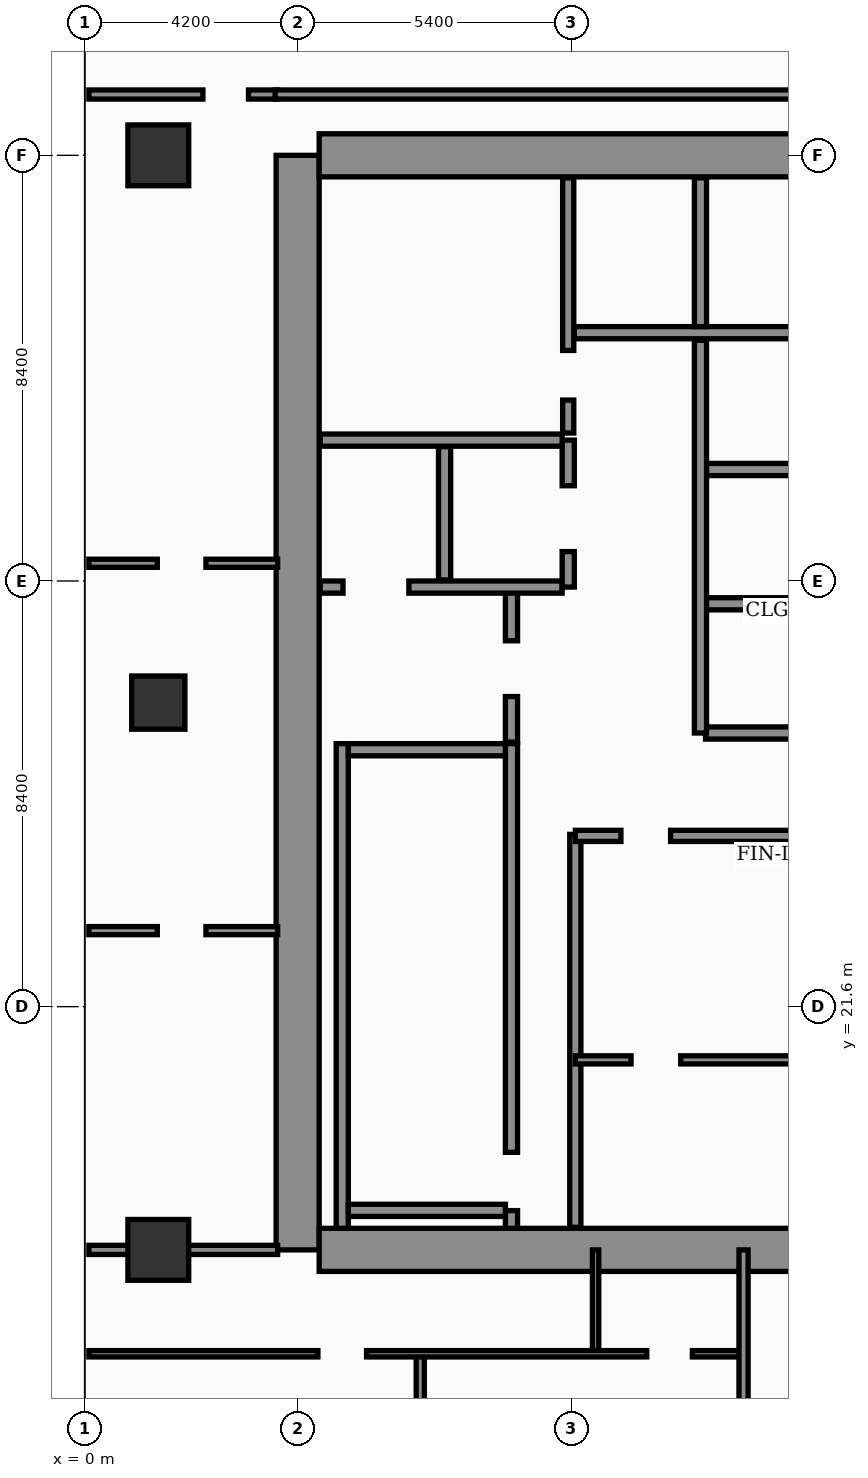
"""IFC4 building model, lengths in metres.
Left out: names, types, materials, properties, quantities, classifications, styles, units other than length and angle.
Written with IfcOpenShell. Run it as: python <this file> out.ifc"""

import sys

from ifc_helpers import new_model, si_unit, direction, frame, frame_2d, origin, origin_2d, place, context, subcontext, project, spatial, rectangle, extrude, element, fill, save


model = new_model("IFC4")
c1 = context("Model", 3, precision=1e-05, world=origin(), true_north=direction((0.0, 1.0)))
c2 = subcontext(c1, "Body", "Model", "MODEL_VIEW")
j1 = project(units=[si_unit("LENGTHUNIT", "METRE"), si_unit("PLANEANGLEUNIT", "RADIAN")], contexts=[c1])
p1 = place(None, origin())
s1 = spatial("IfcSite", under=j1, at=p1, CompositionType="ELEMENT")
p2 = place(p1, origin())
s2 = spatial("IfcBuilding", under=s1, at=p2, CompositionType="ELEMENT")
p3 = place(p2, frame((0.0, 0.0, 171.3)))
s3 = spatial("IfcBuildingStorey", under=s2, at=p3, CompositionType="ELEMENT", Elevation=171.3)
p4 = place(p3, frame((4.2, 16.8, 0.0), z_axis=(0.0, 0.0, 1.0), x_axis=(0.0, 1.0, 0.0)))
e1 = element("IfcWall", 1, at=p4, inside=s3, PredefinedType="SHEAR", context=c2, shape_type="SweptSolid", body=[
    extrude(rectangle(XDim=21.6, YDim=0.85, at=frame_2d((10.8, 0.0))), origin(), (0.0, 0.0, 1.0), 3.56),
])
for number, where, z_axis, x_axis in (
    (2, (4.625, 38.4, 0.0), (0.0, 0.0, 1.0), (1.0, 0.0, 0.0)),
    (3, (4.625, 16.8, 0.0), (0.0, 0.0, 1.0), (1.0, 0.0, 0.0)),
):
    element("IfcWall", number, at=place(p3, frame(where, z_axis=z_axis, x_axis=x_axis)), inside=s3, PredefinedType="SHEAR", context=c2, shape_type="SweptSolid", body=[
        extrude(rectangle(XDim=9.95, YDim=0.85, at=frame_2d((4.975, 0.0))), origin(), (0.0, 0.0, 1.0), 3.56),
    ])
p5 = place(p3, frame((5.08, 17.225, 0.0), z_axis=(0.0, 0.0, 1.0), x_axis=(0.0, 1.0, 0.0)))
e4 = element("IfcWall", 4, at=p5, inside=s3, PredefinedType="SOLIDWALL", context=c2, shape_type="SweptSolid", body=[
    extrude(rectangle(XDim=9.565, YDim=0.24, at=frame_2d((4.782, 0.0))), origin(), (0.0, 0.0, 1.0), 3.56),
])
p6 = place(p3, frame((8.42, 17.225, 0.0), z_axis=(0.0, 0.0, 1.0), x_axis=(0.0, 1.0, 0.0)))
e5 = element("IfcWall", 5, at=p6, inside=s3, PredefinedType="SOLIDWALL", context=c2, shape_type="SweptSolid", body=[
    extrude(rectangle(XDim=9.565, YDim=0.24, at=frame_2d((4.782, 0.0))), origin(), (0.0, 0.0, 1.0), 3.56),
])
p7 = place(p6, frame((0.35, 0.0, 0.0)))
e6 = element("IfcOpeningElement", 6, at=p7, cuts=e5, PredefinedType="OPENING", context=c2, shape_type="SweptSolid", body=[
    extrude(rectangle(XDim=1.15, YDim=2.2, at=frame_2d((0.575, 1.1))), frame((0.0, 0.13, 0.0), z_axis=(0.0, -1.0, 0.0), x_axis=(1.0, 0.0, 0.0)), (0.0, 0.0, 1.0), 0.26),
])
for number, where, z_axis, x_axis in (
    (7, (5.2, 17.58, 0.0), (0.0, 0.0, 1.0), (1.0, 0.0, 0.0)),
    (8, (5.2, 26.67, 0.0), (0.0, 0.0, 1.0), (1.0, 0.0, 0.0)),
):
    element("IfcWall", number, at=place(p3, frame(where, z_axis=z_axis, x_axis=x_axis)), inside=s3, PredefinedType="SOLIDWALL", context=c2, shape_type="SweptSolid", body=[
        extrude(rectangle(XDim=3.1, YDim=0.24, at=frame_2d((1.55, 0.0))), origin(), (0.0, 0.0, 1.0), 3.56),
    ])
for number, where, z_axis, x_axis in (
    (9, (12.18, 29.55, 0.0), (0.0, 0.0, 1.0), (1.0, 0.0, 0.0)),
    (10, (12.18, 32.2, 0.0), (0.0, 0.0, 1.0), (1.0, 0.0, 0.0)),
):
    element("IfcWall", number, at=place(p3, frame(where, z_axis=z_axis, x_axis=x_axis)), inside=s3, PredefinedType="SOLIDWALL", context=c2, shape_type="SweptSolid", body=[
        extrude(rectangle(XDim=2.395, YDim=0.24, at=frame_2d((1.198, 0.0))), origin(), (0.0, 0.0, 1.0), 3.56),
    ])
p8 = place(p3, frame((1.45, 16.8, 0.0), z_axis=(0.0, 0.0, 1.0), x_axis=(1.0, 0.0, 0.0)))
e11 = element("IfcColumn", 11, at=p8, inside=s3, PredefinedType="COLUMN", context=c2, shape_type="SweptSolid", body=[
    extrude(rectangle(XDim=1.2, YDim=1.2, at=origin_2d()), origin(), (0.0, 0.0, 1.0), 3.56),
])
p9 = place(p3, frame((1.45, 27.6, 0.0), z_axis=(0.0, 0.0, 1.0), x_axis=(1.0, 0.0, 0.0)))
e12 = element("IfcColumn", 12, at=p9, inside=s3, PredefinedType="COLUMN", context=c2, shape_type="SweptSolid", body=[
    extrude(rectangle(XDim=1.05, YDim=1.05, at=origin_2d()), origin(), (0.0, 0.0, 1.0), 3.56),
])
p10 = place(p3, frame((1.45, 38.4, 0.0), z_axis=(0.0, 0.0, 1.0), x_axis=(1.0, 0.0, 0.0)))
e13 = element("IfcColumn", 13, at=p10, inside=s3, PredefinedType="COLUMN", context=c2, shape_type="SweptSolid", body=[
    extrude(rectangle(XDim=1.2, YDim=1.2, at=origin_2d()), origin(), (0.0, 0.0, 1.0), 3.56),
])
p11 = place(p3, frame((8.42, 26.82, 0.0), z_axis=(0.0, 0.0, 1.0), x_axis=(0.0, 1.0, 0.0)))
e14 = element("IfcWall", 14, at=p11, inside=s3, PredefinedType="SOLIDWALL", context=c2, shape_type="SweptSolid", body=[
    extrude(rectangle(XDim=3.0, YDim=0.24, at=frame_2d((1.5, 0.0))), origin(), (0.0, 0.0, 1.0), 3.56),
])
p12 = place(p11, frame((0.9, 0.0, 0.0)))
e15 = element("IfcOpeningElement", 15, at=p12, cuts=e14, PredefinedType="OPENING", context=c2, shape_type="SweptSolid", body=[
    extrude(rectangle(XDim=1.1, YDim=2.2, at=frame_2d((0.55, 1.1))), frame((0.0, 0.13, 0.0), z_axis=(0.0, -1.0, 0.0), x_axis=(1.0, 0.0, 0.0)), (0.0, 0.0, 1.0), 0.26),
])
p13 = place(p3, frame((4.645, 29.88, 0.0), z_axis=(0.0, 0.0, 1.0), x_axis=(1.0, 0.0, 0.0)))
e16 = element("IfcWall", 16, at=p13, inside=s3, PredefinedType="SOLIDWALL", context=c2, shape_type="SweptSolid", body=[
    extrude(rectangle(XDim=4.775, YDim=0.24, at=frame_2d((2.387, 0.0))), origin(), (0.0, 0.0, 1.0), 3.56),
])
p14 = place(p13, frame((0.45, 0.0, 0.0)))
e17 = element("IfcOpeningElement", 17, at=p14, cuts=e16, PredefinedType="OPENING", context=c2, shape_type="SweptSolid", body=[
    extrude(rectangle(XDim=1.3, YDim=2.35, at=frame_2d((0.65, 1.175))), frame((0.0, 0.13, 0.0), z_axis=(0.0, -1.0, 0.0), x_axis=(1.0, 0.0, 0.0)), (0.0, 0.0, 1.0), 0.26),
])
p15 = place(p3, frame((7.1, 30.02, 0.0), z_axis=(0.0, 0.0, 1.0), x_axis=(0.0, 1.0, 0.0)))
e18 = element("IfcWall", 18, at=p15, inside=s3, PredefinedType="SOLIDWALL", context=c2, shape_type="SweptSolid", body=[
    extrude(rectangle(XDim=2.63, YDim=0.24, at=frame_2d((1.315, 0.0))), origin(), (0.0, 0.0, 1.0), 3.56),
])
p16 = place(p3, frame((9.54, 29.88, 0.0), z_axis=(0.0, 0.0, 1.0), x_axis=(0.0, 1.0, 0.0)))
e19 = element("IfcWall", 19, at=p16, inside=s3, PredefinedType="SOLIDWALL", context=c2, shape_type="SweptSolid", body=[
    extrude(rectangle(XDim=2.9, YDim=0.24, at=frame_2d((1.45, 0.0))), origin(), (0.0, 0.0, 1.0), 3.56),
])
p17 = place(p16, frame((0.7, 0.0, 0.0)))
e20 = element("IfcOpeningElement", 20, at=p17, cuts=e19, PredefinedType="OPENING", context=c2, shape_type="SweptSolid", body=[
    extrude(rectangle(XDim=1.3, YDim=2.35, at=frame_2d((0.65, 1.175))), frame((0.0, 0.13, 0.0), z_axis=(0.0, -1.0, 0.0), x_axis=(1.0, 0.0, 0.0)), (0.0, 0.0, 1.0), 0.26),
])
p18 = place(p3, frame((4.645, 32.78, 0.0), z_axis=(0.0, 0.0, 1.0), x_axis=(1.0, 0.0, 0.0)))
e21 = element("IfcWall", 21, at=p18, inside=s3, PredefinedType="SOLIDWALL", context=c2, shape_type="SweptSolid", body=[
    extrude(rectangle(XDim=4.775, YDim=0.24, at=frame_2d((2.387, 0.0))), origin(), (0.0, 0.0, 1.0), 3.19),
])
p19 = place(p3, frame((9.68, 17.245, 0.0), z_axis=(0.0, 0.0, 1.0), x_axis=(0.0, 1.0, 0.0)))
e22 = element("IfcWall", 22, at=p19, inside=s3, PredefinedType="SOLIDWALL", context=c2, shape_type="SweptSolid", body=[
    extrude(rectangle(XDim=7.755, YDim=0.22, at=frame_2d((3.877, 0.0))), origin(), (0.0, 0.0, 1.0), 3.56),
])
p20 = place(p3, frame((9.54, 32.92, 0.0), z_axis=(0.0, 0.0, 1.0), x_axis=(0.0, 1.0, 0.0)))
e23 = element("IfcWall", 23, at=p20, inside=s3, PredefinedType="SOLIDWALL", context=c2, shape_type="SweptSolid", body=[
    extrude(rectangle(XDim=5.035, YDim=0.22, at=frame_2d((2.518, 0.0))), origin(), (0.0, 0.0, 1.0), 3.56),
])
p21 = place(p20, frame((0.65, 0.0, 0.0)))
e24 = element("IfcOpeningElement", 24, at=p21, cuts=e23, PredefinedType="OPENING", context=c2, shape_type="SweptSolid", body=[
    extrude(rectangle(XDim=0.98, YDim=2.15, at=frame_2d((0.49, 1.075))), frame((0.0, 0.12, 0.0), z_axis=(0.0, -1.0, 0.0), x_axis=(1.0, 0.0, 0.0)), (0.0, 0.0, 1.0), 0.24),
])
p22 = place(p3, frame((9.68, 20.55, 0.0), z_axis=(0.0, 0.0, 1.0), x_axis=(1.0, 0.0, 0.0)))
e25 = element("IfcWall", 25, at=p22, inside=s3, PredefinedType="PARTITIONING", context=c2, shape_type="SweptSolid", body=[
    extrude(rectangle(XDim=4.875, YDim=0.16, at=frame_2d((2.438, 0.0))), origin(), (0.0, 0.0, 1.0), 3.56),
])
p23 = place(p22, frame((1.1, 0.0, 0.0)))
e26 = element("IfcOpeningElement", 26, at=p23, cuts=e25, PredefinedType="OPENING", context=c2, shape_type="SweptSolid", body=[
    extrude(rectangle(XDim=0.98, YDim=2.15, at=frame_2d((0.49, 1.075))), frame((0.0, 0.09, 0.0), z_axis=(0.0, -1.0, 0.0), x_axis=(1.0, 0.0, 0.0)), (0.0, 0.0, 1.0), 0.18),
])
p24 = place(p3, frame((9.68, 24.97, 0.0), z_axis=(0.0, 0.0, 1.0), x_axis=(1.0, 0.0, 0.0)))
e27 = element("IfcWall", 27, at=p24, inside=s3, PredefinedType="SOLIDWALL", context=c2, shape_type="SweptSolid", body=[
    extrude(rectangle(XDim=4.875, YDim=0.22, at=frame_2d((2.438, 0.0))), origin(), (0.0, 0.0, 1.0), 2.94),
])
p25 = place(p24, frame((0.9, 0.0, 0.0)))
e28 = element("IfcOpeningElement", 28, at=p25, cuts=e27, PredefinedType="OPENING", context=c2, shape_type="SweptSolid", body=[
    extrude(rectangle(XDim=0.98, YDim=2.15, at=frame_2d((0.49, 1.075))), frame((0.0, 0.12, 0.0), z_axis=(0.0, -1.0, 0.0), x_axis=(1.0, 0.0, 0.0)), (0.0, 0.0, 1.0), 0.24),
])
p26 = place(p3, frame((12.25, 27.0, 0.0), z_axis=(0.0, 0.0, 1.0), x_axis=(1.0, 0.0, 0.0)))
e29 = element("IfcWall", 29, at=p26, inside=s3, PredefinedType="SOLIDWALL", context=c2, shape_type="SweptSolid", body=[
    extrude(rectangle(XDim=2.305, YDim=0.24, at=frame_2d((1.152, 0.0))), origin(), (0.0, 0.0, 1.0), 3.56),
])
p27 = place(p3, frame((12.15, 27.0, 0.0), z_axis=(0.0, 0.0, 1.0), x_axis=(0.0, 1.0, 0.0)))
e30 = element("IfcWall", 30, at=p27, inside=s3, PredefinedType="SOLIDWALL", context=c2, shape_type="SweptSolid", body=[
    extrude(rectangle(XDim=7.75, YDim=0.24, at=frame_2d((3.875, 0.0))), origin(), (0.0, 0.0, 1.0), 3.56),
])
p28 = place(p3, frame((9.66, 34.9, 0.0), z_axis=(0.0, 0.0, 1.0), x_axis=(1.0, 0.0, 0.0)))
e31 = element("IfcWall", 31, at=p28, inside=s3, PredefinedType="SOLIDWALL", context=c2, shape_type="SweptSolid", body=[
    extrude(rectangle(XDim=4.895, YDim=0.24, at=frame_2d((2.448, 0.0))), origin(), (0.0, 0.0, 1.0), 3.56),
])
p29 = place(p3, frame((12.15, 35.02, 0.0), z_axis=(0.0, 0.0, 1.0), x_axis=(0.0, 1.0, 0.0)))
e32 = element("IfcWall", 32, at=p29, inside=s3, PredefinedType="SOLIDWALL", context=c2, shape_type="SweptSolid", body=[
    extrude(rectangle(XDim=2.935, YDim=0.24, at=frame_2d((1.468, 0.0))), origin(), (0.0, 0.0, 1.0), 3.56),
])
p30 = place(p3, frame((0.08, 23.1, 0.0), z_axis=(0.0, 0.0, 1.0), x_axis=(1.0, 0.0, 0.0)))
e33 = element("IfcWall", 33, at=p30, inside=s3, PredefinedType="PARTITIONING", context=c2, shape_type="SweptSolid", body=[
    extrude(rectangle(XDim=3.725, YDim=0.16, at=frame_2d((1.862, 0.0))), origin(), (0.0, 0.0, 1.0), 3.04),
])
p31 = place(p30, frame((1.35, 0.0, 0.0)))
e34 = element("IfcOpeningElement", 34, at=p31, cuts=e33, PredefinedType="OPENING", context=c2, shape_type="SweptSolid", body=[
    extrude(rectangle(XDim=0.96, YDim=2.2, at=frame_2d((0.48, 1.1))), frame((0.0, 0.09, 0.0), z_axis=(0.0, -1.0, 0.0), x_axis=(1.0, 0.0, 0.0)), (0.0, 0.0, 1.0), 0.18),
])
p32 = place(p3, frame((0.08, 30.35, 0.0), z_axis=(0.0, 0.0, 1.0), x_axis=(1.0, 0.0, 0.0)))
e35 = element("IfcWall", 35, at=p32, inside=s3, PredefinedType="PARTITIONING", context=c2, shape_type="SweptSolid", body=[
    extrude(rectangle(XDim=3.725, YDim=0.16, at=frame_2d((1.862, 0.0))), origin(), (0.0, 0.0, 1.0), 3.04),
])
p33 = place(p32, frame((1.35, 0.0, 0.0)))
e36 = element("IfcOpeningElement", 36, at=p33, cuts=e35, PredefinedType="OPENING", context=c2, shape_type="SweptSolid", body=[
    extrude(rectangle(XDim=0.96, YDim=2.2, at=frame_2d((0.48, 1.1))), frame((0.0, 0.09, 0.0), z_axis=(0.0, -1.0, 0.0), x_axis=(1.0, 0.0, 0.0)), (0.0, 0.0, 1.0), 0.18),
])
p34 = place(p3, frame((0.08, 16.8, 0.0), z_axis=(0.0, 0.0, 1.0), x_axis=(1.0, 0.0, 0.0)))
e37 = element("IfcWall", 37, at=p34, inside=s3, PredefinedType="PARTITIONING", context=c2, shape_type="SweptSolid", body=[
    extrude(rectangle(XDim=3.725, YDim=0.18, at=frame_2d((1.862, 0.0))), origin(), (0.0, 0.0, 1.0), 2.94),
])
p35 = place(p3, frame((0.08, 39.6, 0.0), z_axis=(0.0, 0.0, 1.0), x_axis=(1.0, 0.0, 0.0)))
e38 = element("IfcWall", 38, at=p35, inside=s3, PredefinedType="PARTITIONING", context=c2, shape_type="SweptSolid", body=[
    extrude(rectangle(XDim=3.725, YDim=0.18, at=frame_2d((1.862, 0.0))), origin(), (0.0, 0.0, 1.0), 2.94),
])
p36 = place(p35, frame((2.25, 0.0, 0.0)))
e39 = element("IfcOpeningElement", 39, at=p36, cuts=e38, PredefinedType="OPENING", context=c2, shape_type="SweptSolid", body=[
    extrude(rectangle(XDim=0.9, YDim=2.15, at=frame_2d((0.45, 1.075))), frame((0.0, 0.1, 0.0), z_axis=(0.0, -1.0, 0.0), x_axis=(1.0, 0.0, 0.0)), (0.0, 0.0, 1.0), 0.2),
])
p37 = place(p3, frame((10.08, 14.75, 0.0), z_axis=(0.0, 0.0, 1.0), x_axis=(0.0, 1.0, 0.0)))
e40 = element("IfcWall", 40, at=p37, inside=s3, PredefinedType="PARTITIONING", context=c2, shape_type="SweptSolid", body=[
    extrude(rectangle(XDim=2.05, YDim=0.125, at=frame_2d((1.025, 0.0))), origin(), (0.0, 0.0, 1.0), 3.56),
])
p38 = place(p3, frame((6.62, 11.35, 0.0), z_axis=(0.0, 0.0, 1.0), x_axis=(0.0, 1.0, 0.0)))
e41 = element("IfcWall", 41, at=p38, inside=s3, PredefinedType="PARTITIONING", context=c2, shape_type="SweptSolid", body=[
    extrude(rectangle(XDim=3.4, YDim=0.16, at=frame_2d((1.7, 0.0))), origin(), (0.0, 0.0, 1.0), 3.56),
])
p39 = place(p38, frame((1.22, 0.0, 0.0)))
e42 = element("IfcOpeningElement", 42, at=p39, cuts=e41, PredefinedType="OPENING", context=c2, shape_type="SweptSolid", body=[
    extrude(rectangle(XDim=0.96, YDim=2.2, at=frame_2d((0.48, 1.1))), frame((0.0, 0.09, 0.0), z_axis=(0.0, -1.0, 0.0), x_axis=(1.0, 0.0, 0.0)), (0.0, 0.0, 1.0), 0.18),
])
p40 = place(p3, frame((0.08, 14.75, 0.0), z_axis=(0.0, 0.0, 1.0), x_axis=(1.0, 0.0, 0.0)))
e43 = element("IfcWall", 43, at=p40, inside=s3, PredefinedType="PARTITIONING", context=c2, shape_type="SweptSolid", body=[
    extrude(rectangle(XDim=12.92, YDim=0.125, at=frame_2d((6.46, 0.0))), origin(), (0.0, 0.0, 1.0), 2.94),
])
p41 = place(p40, frame((4.52, 0.0, 0.0)))
e44 = element("IfcOpeningElement", 44, at=p41, cuts=e43, PredefinedType="OPENING", context=c2, shape_type="SweptSolid", body=[
    extrude(rectangle(XDim=0.96, YDim=2.2, at=frame_2d((0.48, 1.1))), frame((0.0, 0.073, 0.0), z_axis=(0.0, -1.0, 0.0), x_axis=(1.0, 0.0, 0.0)), (0.0, 0.0, 1.0), 0.145),
])
p42 = place(p40, frame((11.01, 0.0, 0.0)))
e45 = element("IfcOpeningElement", 45, at=p42, cuts=e43, PredefinedType="OPENING", context=c2, shape_type="SweptSolid", body=[
    extrude(rectangle(XDim=0.9, YDim=2.15, at=frame_2d((0.45, 1.075))), frame((0.0, 0.073, 0.0), z_axis=(0.0, -1.0, 0.0), x_axis=(1.0, 0.0, 0.0)), (0.0, 0.0, 1.0), 0.145),
])
p43 = place(p3, frame((13.0, 2.44, 0.0), z_axis=(0.0, 0.0, 1.0), x_axis=(0.0, 1.0, 0.0)))
e46 = element("IfcWall", 46, at=p43, inside=s3, PredefinedType="PARTITIONING", context=c2, shape_type="SweptSolid", body=[
    extrude(rectangle(XDim=14.36, YDim=0.18, at=frame_2d((7.18, 0.0))), origin(), (0.0, 0.0, 1.0), 2.94),
])
p44 = place(p43, frame((3.01, 0.0, 0.0)))
e47 = element("IfcOpeningElement", 47, at=p44, cuts=e46, PredefinedType="OPENING", context=c2, shape_type="SweptSolid", body=[
    extrude(rectangle(XDim=1.02, YDim=2.2, at=frame_2d((0.51, 1.1))), frame((0.0, 0.1, 0.0), z_axis=(0.0, -1.0, 0.0), x_axis=(1.0, 0.0, 0.0)), (0.0, 0.0, 1.0), 0.2),
])
p45 = place(p43, frame((10.1, 0.0, 0.0)))
e48 = element("IfcOpeningElement", 48, at=p45, cuts=e46, PredefinedType="OPENING", context=c2, shape_type="SweptSolid", body=[
    extrude(rectangle(XDim=1.02, YDim=2.2, at=frame_2d((0.51, 1.1))), frame((0.0, 0.1, 0.0), z_axis=(0.0, -1.0, 0.0), x_axis=(1.0, 0.0, 0.0)), (0.0, 0.0, 1.0), 0.2),
])
p46 = place(p3, frame((3.755, 39.6, 0.0), z_axis=(0.0, 0.0, 1.0), x_axis=(1.0, 0.0, 0.0)))
e49 = element("IfcWall", 49, at=p46, inside=s3, PredefinedType="PARTITIONING", context=c2, shape_type="SweptSolid", body=[
    extrude(rectangle(XDim=11.395, YDim=0.18, at=frame_2d((5.698, 0.0))), origin(), (0.0, 0.0, 1.0), 2.94),
])
p47 = place(p12, origin())
e50 = element("IfcDoor", 50, at=p47, inside=s3, OperationType="SINGLE_SWING_RIGHT", PredefinedType="DOOR", context=c2, shape_type="SweptSolid", body=[
    extrude(rectangle(XDim=1.1, YDim=2.2, at=frame_2d((0.55, 1.1))), frame((0.0, 0.025, 0.0), z_axis=(0.0, -1.0, 0.0), x_axis=(1.0, 0.0, 0.0)), (0.0, 0.0, 1.0), 0.05),
])
fill(e15, e50)
p48 = place(p14, origin())
e51 = element("IfcDoor", 51, at=p48, inside=s3, OperationType="DOUBLE_DOOR_SLIDING", PredefinedType="DOOR", context=c2, shape_type="SweptSolid", body=[
    extrude(rectangle(XDim=1.3, YDim=2.35, at=frame_2d((0.65, 1.175))), frame((0.0, 0.025, 0.0), z_axis=(0.0, -1.0, 0.0), x_axis=(1.0, 0.0, 0.0)), (0.0, 0.0, 1.0), 0.05),
])
fill(e17, e51)
p49 = place(p17, origin())
e52 = element("IfcDoor", 52, at=p49, inside=s3, OperationType="DOUBLE_DOOR_SLIDING", PredefinedType="DOOR", context=c2, shape_type="SweptSolid", body=[
    extrude(rectangle(XDim=1.3, YDim=2.35, at=frame_2d((0.65, 1.175))), frame((0.0, 0.025, 0.0), z_axis=(0.0, -1.0, 0.0), x_axis=(1.0, 0.0, 0.0)), (0.0, 0.0, 1.0), 0.05),
])
fill(e20, e52)
p50 = place(p21, origin())
e53 = element("IfcDoor", 53, at=p50, inside=s3, OperationType="SINGLE_SWING_LEFT", PredefinedType="DOOR", context=c2, shape_type="SweptSolid", body=[
    extrude(rectangle(XDim=0.98, YDim=2.15, at=frame_2d((0.49, 1.075))), frame((0.0, 0.025, 0.0), z_axis=(0.0, -1.0, 0.0), x_axis=(1.0, 0.0, 0.0)), (0.0, 0.0, 1.0), 0.05),
])
fill(e24, e53)
p51 = place(p23, origin())
e54 = element("IfcDoor", 54, at=p51, inside=s3, OperationType="SINGLE_SWING_LEFT", PredefinedType="DOOR", context=c2, shape_type="SweptSolid", body=[
    extrude(rectangle(XDim=0.98, YDim=2.15, at=frame_2d((0.49, 1.075))), frame((0.0, 0.025, 0.0), z_axis=(0.0, -1.0, 0.0), x_axis=(1.0, 0.0, 0.0)), (0.0, 0.0, 1.0), 0.05),
])
fill(e26, e54)
p52 = place(p25, origin())
e55 = element("IfcDoor", 55, at=p52, inside=s3, OperationType="SINGLE_SWING_RIGHT", PredefinedType="DOOR", context=c2, shape_type="SweptSolid", body=[
    extrude(rectangle(XDim=0.98, YDim=2.15, at=frame_2d((0.49, 1.075))), frame((0.0, 0.025, 0.0), z_axis=(0.0, -1.0, 0.0), x_axis=(1.0, 0.0, 0.0)), (0.0, 0.0, 1.0), 0.05),
])
fill(e28, e55)
p53 = place(p31, origin())
e56 = element("IfcDoor", 56, at=p53, inside=s3, OperationType="SINGLE_SWING_LEFT", PredefinedType="DOOR", context=c2, shape_type="SweptSolid", body=[
    extrude(rectangle(XDim=0.96, YDim=2.2, at=frame_2d((0.48, 1.1))), frame((0.0, 0.025, 0.0), z_axis=(0.0, -1.0, 0.0), x_axis=(1.0, 0.0, 0.0)), (0.0, 0.0, 1.0), 0.05),
])
fill(e34, e56)
p54 = place(p33, origin())
e57 = element("IfcDoor", 57, at=p54, inside=s3, OperationType="SINGLE_SWING_RIGHT", PredefinedType="DOOR", context=c2, shape_type="SweptSolid", body=[
    extrude(rectangle(XDim=0.96, YDim=2.2, at=frame_2d((0.48, 1.1))), frame((0.0, 0.025, 0.0), z_axis=(0.0, -1.0, 0.0), x_axis=(1.0, 0.0, 0.0)), (0.0, 0.0, 1.0), 0.05),
])
fill(e36, e57)
p55 = place(p36, origin())
e58 = element("IfcDoor", 58, at=p55, inside=s3, OperationType="SINGLE_SWING_LEFT", PredefinedType="DOOR", context=c2, shape_type="SweptSolid", body=[
    extrude(rectangle(XDim=0.9, YDim=2.15, at=frame_2d((0.45, 1.075))), frame((0.0, 0.025, 0.0), z_axis=(0.0, -1.0, 0.0), x_axis=(1.0, 0.0, 0.0)), (0.0, 0.0, 1.0), 0.05),
])
fill(e39, e58)
p56 = place(p41, origin())
e59 = element("IfcDoor", 59, at=p56, inside=s3, OperationType="SINGLE_SWING_LEFT", PredefinedType="DOOR", context=c2, shape_type="SweptSolid", body=[
    extrude(rectangle(XDim=0.96, YDim=2.2, at=frame_2d((0.48, 1.1))), frame((0.0, 0.025, 0.0), z_axis=(0.0, -1.0, 0.0), x_axis=(1.0, 0.0, 0.0)), (0.0, 0.0, 1.0), 0.05),
])
fill(e44, e59)
p57 = place(p42, origin())
e60 = element("IfcDoor", 60, at=p57, inside=s3, OperationType="SINGLE_SWING_RIGHT", PredefinedType="DOOR", context=c2, shape_type="SweptSolid", body=[
    extrude(rectangle(XDim=0.9, YDim=2.15, at=frame_2d((0.45, 1.075))), frame((0.0, 0.025, 0.0), z_axis=(0.0, -1.0, 0.0), x_axis=(1.0, 0.0, 0.0)), (0.0, 0.0, 1.0), 0.05),
])
fill(e45, e60)
p58 = place(p7, origin())
e61 = element("IfcDoor", 61, at=p58, inside=s3, OperationType="SINGLE_SWING_LEFT", PredefinedType="DOOR", context=c2, shape_type="SweptSolid", body=[
    extrude(rectangle(XDim=1.15, YDim=2.2, at=frame_2d((0.575, 1.1))), frame((0.0, 0.025, 0.0), z_axis=(0.0, -1.0, 0.0), x_axis=(1.0, 0.0, 0.0)), (0.0, 0.0, 1.0), 0.05),
])
fill(e6, e61)
save(model, sys.argv[1])
